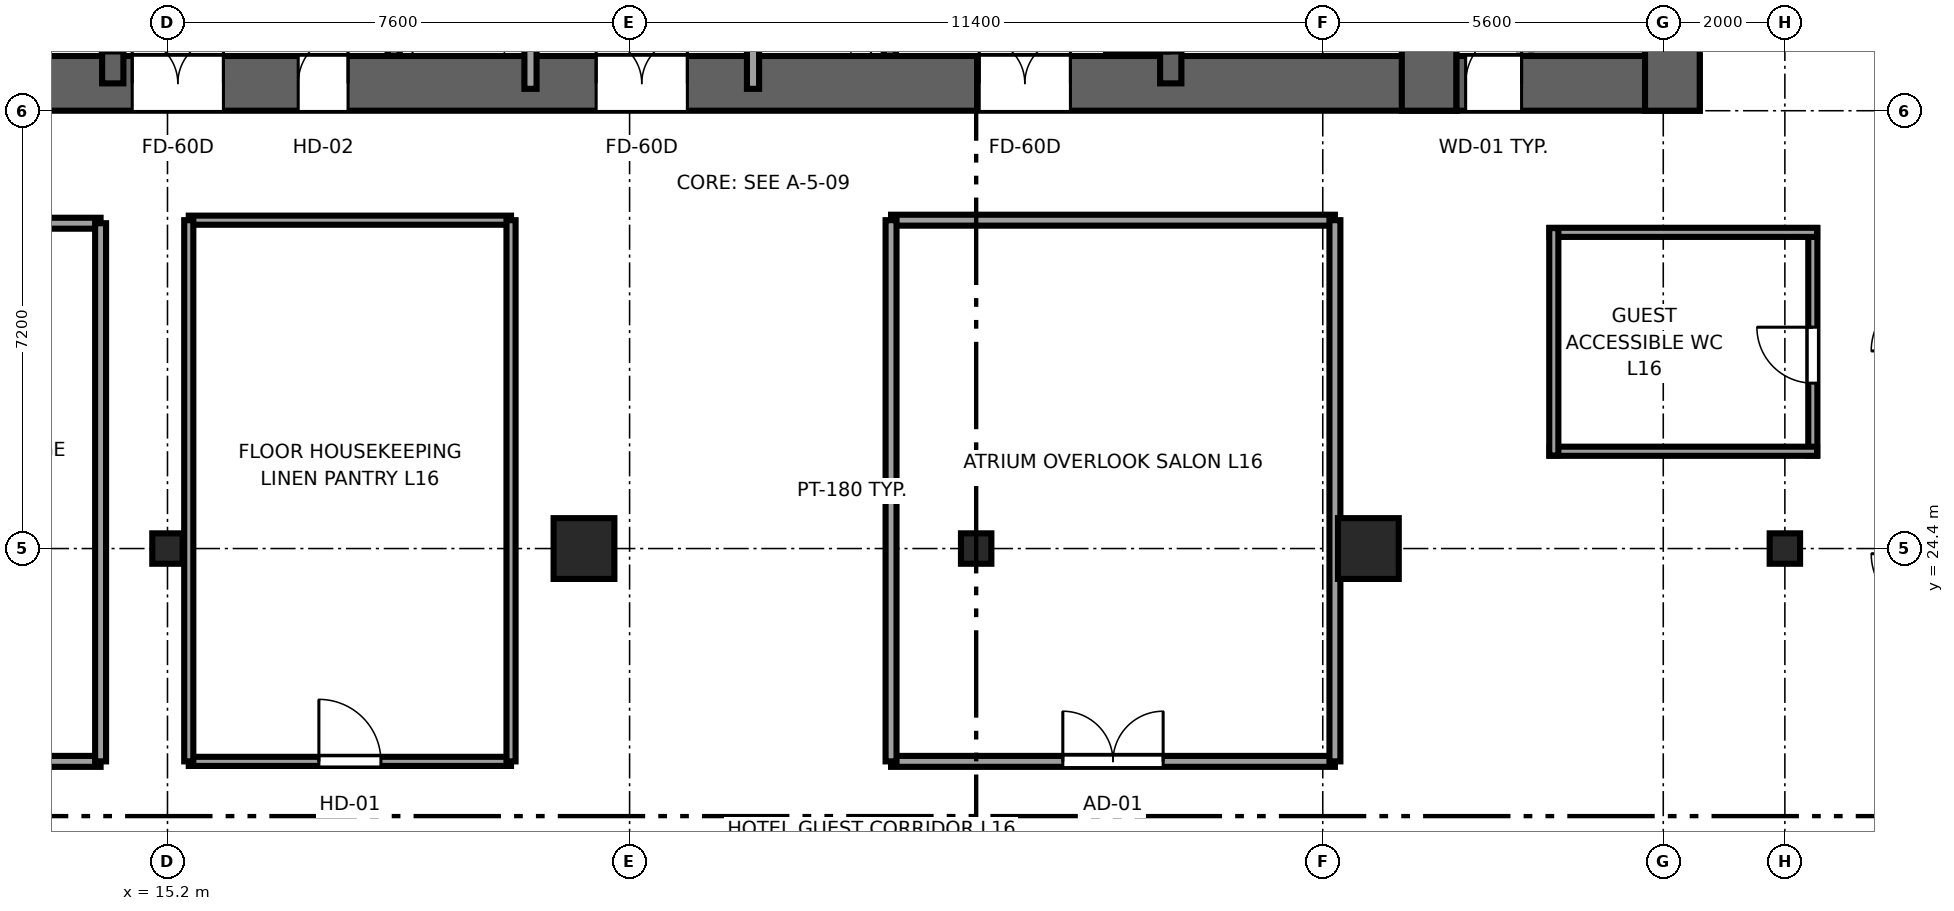
"""IFC4 building model, lengths in metres.
Left out: names, types, materials, properties, quantities, classifications, styles, units other than length and angle.
Written with IfcOpenShell. Run it as: python <this file> out.ifc"""

import sys

from ifc_helpers import new_model, si_unit, direction, frame, frame_2d, origin, origin_2d, place, context, subcontext, project, spatial, rectangle, i_section, extrude, source, transform, mapped, element, fill, save


model = new_model("IFC4")
c1 = context("Model", 3, precision=1e-05, world=origin(), true_north=direction((0.0, 1.0)))
c2 = subcontext(c1, "Body", "Model", "MODEL_VIEW")
j1 = project(units=[si_unit("LENGTHUNIT", "METRE"), si_unit("PLANEANGLEUNIT", "RADIAN")], contexts=[c1])
p1 = place(None, origin())
s1 = spatial("IfcSite", under=j1, at=p1, CompositionType="ELEMENT")
p2 = place(p1, origin())
s2 = spatial("IfcBuilding", under=s1, at=p2, CompositionType="ELEMENT")
p3 = place(p2, frame((0.0, 0.0, 67.5)))
s3 = spatial("IfcBuildingStorey", under=s2, at=p3, CompositionType="ELEMENT", Elevation=67.5)
p4 = place(p3, frame((9.6, 32.05, 0.0), z_axis=(0.0, 0.0, 1.0), x_axis=(1.0, 0.0, 0.0)))
e1 = element("IfcWall", 1, at=p4, inside=s3, PredefinedType="SHEAR", context=c2, shape_type="SweptSolid", body=[
    extrude(rectangle(XDim=26.8, YDim=0.9, at=frame_2d((13.4, 0.0))), origin(), (0.0, 0.0, 1.0), 3.55),
])
p5 = place(p4, frame((6.52, 0.0, 0.0), z_axis=(0.0, 0.0, 1.0), x_axis=(-1.0, 0.0, 0.0)))
e2 = element("IfcOpeningElement", 2, at=p5, cuts=e1, PredefinedType="OPENING", context=c2, shape_type="SweptSolid", body=[
    extrude(rectangle(XDim=1.5, YDim=2.04, at=frame_2d((0.75, 1.02))), frame((0.0, 0.46, 0.0), z_axis=(0.0, -1.0, 0.0), x_axis=(1.0, 0.0, 0.0)), (0.0, 0.0, 1.0), 0.92),
])
p6 = place(p4, frame((14.15, 0.0, 0.0), z_axis=(0.0, 0.0, 1.0), x_axis=(-1.0, 0.0, 0.0)))
e3 = element("IfcOpeningElement", 3, at=p6, cuts=e1, PredefinedType="OPENING", context=c2, shape_type="SweptSolid", body=[
    extrude(rectangle(XDim=1.5, YDim=2.04, at=frame_2d((0.75, 1.02))), frame((0.0, 0.46, 0.0), z_axis=(0.0, -1.0, 0.0), x_axis=(1.0, 0.0, 0.0)), (0.0, 0.0, 1.0), 0.92),
])
p7 = place(p4, frame((20.45, 0.0, 0.0), z_axis=(0.0, 0.0, 1.0), x_axis=(-1.0, 0.0, 0.0)))
e4 = element("IfcOpeningElement", 4, at=p7, cuts=e1, PredefinedType="OPENING", context=c2, shape_type="SweptSolid", body=[
    extrude(rectangle(XDim=1.5, YDim=2.04, at=frame_2d((0.75, 1.02))), frame((0.0, 0.46, 0.0), z_axis=(0.0, -1.0, 0.0), x_axis=(1.0, 0.0, 0.0)), (0.0, 0.0, 1.0), 0.92),
])
p8 = place(p4, frame((8.57, 0.0, 0.0), z_axis=(0.0, 0.0, 1.0), x_axis=(-1.0, 0.0, 0.0)))
e5 = element("IfcOpeningElement", 5, at=p8, cuts=e1, PredefinedType="OPENING", context=c2, shape_type="SweptSolid", body=[
    extrude(rectangle(XDim=0.82, YDim=2.01, at=frame_2d((0.41, 1.005))), frame((0.0, 0.46, 0.0), z_axis=(0.0, -1.0, 0.0), x_axis=(1.0, 0.0, 0.0)), (0.0, 0.0, 1.0), 0.92),
])
p9 = place(p3, frame((35.95, 31.6, 0.0), z_axis=(0.0, 0.0, 1.0), x_axis=(0.0, 1.0, 0.0)))
e6 = element("IfcWall", 6, at=p9, inside=s3, PredefinedType="SHEAR", context=c2, shape_type="SweptSolid", body=[
    extrude(rectangle(XDim=13.6, YDim=0.9, at=frame_2d((6.8, 0.0))), origin(), (0.0, 0.0, 1.0), 3.55),
])
p10 = place(p3, frame((14.3, 32.05, 0.0), z_axis=(0.0, 0.0, 1.0), x_axis=(0.0, 1.0, 0.0)))
e7 = element("IfcWall", 7, at=p10, inside=s3, PredefinedType="SHEAR", context=c2, shape_type="SweptSolid", body=[
    extrude(rectangle(XDim=12.7, YDim=0.35, at=frame_2d((6.35, 0.0))), origin(), (0.0, 0.0, 1.0), 3.55),
])
p11 = place(p10, frame((0.5, 0.0, 0.0)))
e8 = element("IfcOpeningElement", 8, at=p11, cuts=e7, PredefinedType="OPENING", context=c2, shape_type="SweptSolid", body=[
    extrude(rectangle(XDim=1.1, YDim=2.12, at=frame_2d((0.55, 1.06))), frame((0.0, 0.185, 0.0), z_axis=(0.0, -1.0, 0.0), x_axis=(1.0, 0.0, 0.0)), (0.0, 0.0, 1.0), 0.37),
])
p12 = place(p3, frame((31.7, 32.05, 0.0), z_axis=(0.0, 0.0, 1.0), x_axis=(0.0, 1.0, 0.0)))
e9 = element("IfcWall", 9, at=p12, inside=s3, PredefinedType="SHEAR", context=c2, shape_type="SweptSolid", body=[
    extrude(rectangle(XDim=12.7, YDim=0.35, at=frame_2d((6.35, 0.0))), origin(), (0.0, 0.0, 1.0), 3.55),
])
p13 = place(p12, frame((1.6, 0.0, 0.0), z_axis=(0.0, 0.0, 1.0), x_axis=(-1.0, 0.0, 0.0)))
e10 = element("IfcOpeningElement", 10, at=p13, cuts=e9, PredefinedType="OPENING", context=c2, shape_type="SweptSolid", body=[
    extrude(rectangle(XDim=1.1, YDim=2.12, at=frame_2d((0.55, 1.06))), frame((0.0, 0.185, 0.0), z_axis=(0.0, -1.0, 0.0), x_axis=(1.0, 0.0, 0.0)), (0.0, 0.0, 1.0), 0.37),
])
p14 = place(p3, frame((36.4, 32.05, 0.0), z_axis=(0.0, 0.0, 1.0), x_axis=(1.0, 0.0, 0.0)))
e11 = element("IfcWall", 11, at=p14, inside=s3, PredefinedType="SHEAR", context=c2, shape_type="SweptSolid", body=[
    extrude(rectangle(XDim=4.0, YDim=0.9, at=frame_2d((2.0, 0.0))), origin(), (0.0, 0.0, 1.0), 3.55),
])
p15 = place(p14, frame((1.07, 0.0, 0.0), z_axis=(0.0, 0.0, 1.0), x_axis=(-1.0, 0.0, 0.0)))
e12 = element("IfcOpeningElement", 12, at=p15, cuts=e11, PredefinedType="OPENING", context=c2, shape_type="SweptSolid", body=[
    extrude(rectangle(XDim=0.92, YDim=2.01, at=frame_2d((0.46, 1.005))), frame((0.0, 0.46, 0.0), z_axis=(0.0, -1.0, 0.0), x_axis=(1.0, 0.0, 0.0)), (0.0, 0.0, 1.0), 0.92),
])
p16 = place(p3, frame((39.95, 31.6, 0.0), z_axis=(0.0, 0.0, 1.0), x_axis=(0.0, 1.0, 0.0)))
e13 = element("IfcWall", 13, at=p16, inside=s3, PredefinedType="SHEAR", context=c2, shape_type="SweptSolid", body=[
    extrude(rectangle(XDim=13.6, YDim=0.9, at=frame_2d((6.8, 0.0))), origin(), (0.0, 0.0, 1.0), 3.55),
])
m1 = source(origin(), c2, "Body", "SweptSolid", [
    extrude(i_section(OverallWidth=0.5, OverallDepth=0.5, WebThickness=0.028, FlangeThickness=0.045, at=origin_2d()), origin(), (0.0, 0.0, 1.0), 3.55),
])
p17 = place(p3, frame((15.2, 24.4, 0.0), z_axis=(0.0, 0.0, 1.0), x_axis=(1.0, 0.0, 0.0)))
e14 = element("IfcColumn", 14, at=p17, inside=s3, PredefinedType="COLUMN", context=c2, shape_type="MappedRepresentation", body=[
    mapped(m1, transform((0.0, 0.0, 0.0), x_axis=(1.0, 0.0, 0.0), y_axis=(0.0, 1.0, 0.0), z_axis=(0.0, 0.0, 1.0), scale=1.0)),
])
m2 = source(origin(), c2, "Body", "SweptSolid", [
    extrude(rectangle(XDim=1.0, YDim=1.0, at=origin_2d()), origin(), (0.0, 0.0, 1.0), 3.55),
])
for number, where, z_axis, x_axis in (
    (15, (22.05, 24.4, 0.0), (0.0, 0.0, 1.0), (1.0, 0.0, 0.0)),
    (16, (34.95, 24.4, 0.0), (0.0, 0.0, 1.0), (1.0, 0.0, 0.0)),
):
    element("IfcColumn", number, at=place(p3, frame(where, z_axis=z_axis, x_axis=x_axis)), inside=s3, PredefinedType="COLUMN", context=c2, shape_type="MappedRepresentation", body=[
        mapped(m2, transform((0.0, 0.0, 0.0), x_axis=(1.0, 0.0, 0.0), y_axis=(0.0, 1.0, 0.0), z_axis=(0.0, 0.0, 1.0), scale=1.0)),
    ])
for number, where, z_axis, x_axis in (
    (17, (41.8, 24.4, 0.0), (0.0, 0.0, 1.0), (1.0, 0.0, 0.0)),
    (18, (28.5, 24.4, 0.0), (0.0, 0.0, 1.0), (1.0, 0.0, 0.0)),
):
    element("IfcColumn", number, at=place(p3, frame(where, z_axis=z_axis, x_axis=x_axis)), inside=s3, PredefinedType="COLUMN", context=c2, shape_type="MappedRepresentation", body=[
        mapped(m1, transform((0.0, 0.0, 0.0), x_axis=(1.0, 0.0, 0.0), y_axis=(0.0, 1.0, 0.0), z_axis=(0.0, 0.0, 1.0), scale=1.0)),
    ])
for number, where, z_axis, x_axis in (
    (19, (18.92, 32.504, 0.0), (0.0, 0.0, 1.0), (0.0, 1.0, 0.0)),
    (20, (27.08, 32.504, 0.0), (0.0, 0.0, 1.0), (0.0, 1.0, 0.0)),
):
    element("IfcWall", number, at=place(p3, frame(where, z_axis=z_axis, x_axis=x_axis)), inside=s3, PredefinedType="SOLIDWALL", context=c2, shape_type="SweptSolid", body=[
        extrude(rectangle(XDim=3.646, YDim=0.2, at=frame_2d((1.823, 0.0))), origin(), (0.0, 0.0, 1.0), 3.37),
    ])
for number, where, z_axis, x_axis in (
    (21, (21.17, 31.96, 0.0), (0.0, 0.0, 1.0), (0.0, 1.0, 0.0)),
    (22, (24.83, 31.96, 0.0), (0.0, 0.0, 1.0), (0.0, 1.0, 0.0)),
):
    element("IfcWall", number, at=place(p3, frame(where, z_axis=z_axis, x_axis=x_axis)), inside=s3, PredefinedType="SOLIDWALL", context=c2, shape_type="SweptSolid", body=[
        extrude(rectangle(XDim=12.58, YDim=0.2, at=frame_2d((6.29, 0.0))), origin(), (0.0, 0.0, 1.0), 3.37),
    ])
p18 = place(p3, frame((42.26, 25.93, 0.0), z_axis=(0.0, 0.0, 1.0), x_axis=(0.0, 1.0, 0.0)))
e23 = element("IfcWall", 23, at=p18, inside=s3, PredefinedType="PARTITIONING", context=c2, shape_type="SweptSolid", body=[
    extrude(rectangle(XDim=3.74, YDim=0.15, at=frame_2d((1.87, 0.0))), origin(), (0.0, 0.0, 1.0), 3.37),
])
p19 = place(p18, frame((1.19, 0.0, 0.0)))
e24 = element("IfcOpeningElement", 24, at=p19, cuts=e23, PredefinedType="OPENING", context=c2, shape_type="SweptSolid", body=[
    extrude(rectangle(XDim=0.92, YDim=2.01, at=frame_2d((0.46, 1.005))), frame((0.0, 0.085, 0.0), z_axis=(0.0, -1.0, 0.0), x_axis=(1.0, 0.0, 0.0)), (0.0, 0.0, 1.0), 0.17),
])
for number, where, z_axis, x_axis in (
    (25, (37.93, 26.0, 0.0), (0.0, 0.0, 1.0), (1.0, 0.0, 0.0)),
    (26, (37.93, 29.6, 0.0), (0.0, 0.0, 1.0), (1.0, 0.0, 0.0)),
):
    element("IfcWall", number, at=place(p3, frame(where, z_axis=z_axis, x_axis=x_axis)), inside=s3, PredefinedType="PARTITIONING", context=c2, shape_type="SweptSolid", body=[
        extrude(rectangle(XDim=4.4, YDim=0.15, at=frame_2d((2.2, 0.0))), origin(), (0.0, 0.0, 1.0), 3.37),
    ])
p20 = place(p3, frame((38.0, 25.93, 0.0), z_axis=(0.0, 0.0, 1.0), x_axis=(0.0, 1.0, 0.0)))
e27 = element("IfcWall", 27, at=p20, inside=s3, PredefinedType="PARTITIONING", context=c2, shape_type="SweptSolid", body=[
    extrude(rectangle(XDim=3.74, YDim=0.15, at=frame_2d((1.87, 0.0))), origin(), (0.0, 0.0, 1.0), 3.37),
])
p21 = place(p3, frame((9.88, 20.9, 0.0), z_axis=(0.0, 0.0, 1.0), x_axis=(1.0, 0.0, 0.0)))
e28 = element("IfcWall", 28, at=p21, inside=s3, PredefinedType="PARTITIONING", context=c2, shape_type="SweptSolid", body=[
    extrude(rectangle(XDim=4.22, YDim=0.18, at=frame_2d((2.11, 0.0))), origin(), (0.0, 0.0, 1.0), 3.37),
])
p22 = place(p21, frame((1.285, 0.0, 0.0)))
e29 = element("IfcOpeningElement", 29, at=p22, cuts=e28, PredefinedType="OPENING", context=c2, shape_type="SweptSolid", body=[
    extrude(rectangle(XDim=1.65, YDim=2.15, at=frame_2d((0.825, 1.075))), frame((0.0, 0.1, 0.0), z_axis=(0.0, -1.0, 0.0), x_axis=(1.0, 0.0, 0.0)), (0.0, 0.0, 1.0), 0.2),
])
p23 = place(p3, frame((9.88, 29.75, 0.0), z_axis=(0.0, 0.0, 1.0), x_axis=(1.0, 0.0, 0.0)))
e30 = element("IfcWall", 30, at=p23, inside=s3, PredefinedType="PARTITIONING", context=c2, shape_type="SweptSolid", body=[
    extrude(rectangle(XDim=4.22, YDim=0.18, at=frame_2d((2.11, 0.0))), origin(), (0.0, 0.0, 1.0), 3.37),
])
p24 = place(p3, frame((14.1, 20.9, 0.0), z_axis=(0.0, 0.0, 1.0), x_axis=(0.0, 1.0, 0.0)))
e31 = element("IfcWall", 31, at=p24, inside=s3, PredefinedType="PARTITIONING", context=c2, shape_type="SweptSolid", body=[
    extrude(rectangle(XDim=8.85, YDim=0.18, at=frame_2d((4.425, 0.0))), origin(), (0.0, 0.0, 1.0), 3.37),
])
p25 = place(p3, frame((27.1, 20.9, 0.0), z_axis=(0.0, 0.0, 1.0), x_axis=(1.0, 0.0, 0.0)))
e32 = element("IfcWall", 32, at=p25, inside=s3, PredefinedType="PARTITIONING", context=c2, shape_type="SweptSolid", body=[
    extrude(rectangle(XDim=7.3, YDim=0.18, at=frame_2d((3.65, 0.0))), origin(), (0.0, 0.0, 1.0), 3.37),
])
p26 = place(p25, frame((2.825, 0.0, 0.0)))
e33 = element("IfcOpeningElement", 33, at=p26, cuts=e32, PredefinedType="OPENING", context=c2, shape_type="SweptSolid", body=[
    extrude(rectangle(XDim=1.65, YDim=2.15, at=frame_2d((0.825, 1.075))), frame((0.0, 0.1, 0.0), z_axis=(0.0, -1.0, 0.0), x_axis=(1.0, 0.0, 0.0)), (0.0, 0.0, 1.0), 0.2),
])
p27 = place(p3, frame((27.1, 29.8, 0.0), z_axis=(0.0, 0.0, 1.0), x_axis=(1.0, 0.0, 0.0)))
e34 = element("IfcWall", 34, at=p27, inside=s3, PredefinedType="PARTITIONING", context=c2, shape_type="SweptSolid", body=[
    extrude(rectangle(XDim=7.3, YDim=0.18, at=frame_2d((3.65, 0.0))), origin(), (0.0, 0.0, 1.0), 3.37),
])
for number, where, z_axis, x_axis in (
    (35, (27.1, 20.9, 0.0), (0.0, 0.0, 1.0), (0.0, 1.0, 0.0)),
    (36, (34.4, 20.9, 0.0), (0.0, 0.0, 1.0), (0.0, 1.0, 0.0)),
):
    element("IfcWall", number, at=place(p3, frame(where, z_axis=z_axis, x_axis=x_axis)), inside=s3, PredefinedType="PARTITIONING", context=c2, shape_type="SweptSolid", body=[
        extrude(rectangle(XDim=8.9, YDim=0.18, at=frame_2d((4.45, 0.0))), origin(), (0.0, 0.0, 1.0), 3.37),
    ])
p28 = place(p3, frame((15.55, 20.9, 0.0), z_axis=(0.0, 0.0, 1.0), x_axis=(1.0, 0.0, 0.0)))
e37 = element("IfcWall", 37, at=p28, inside=s3, PredefinedType="PARTITIONING", context=c2, shape_type="SweptSolid", body=[
    extrude(rectangle(XDim=5.3, YDim=0.15, at=frame_2d((2.65, 0.0))), origin(), (0.0, 0.0, 1.0), 3.37),
])
p29 = place(p28, frame((2.14, 0.0, 0.0)))
e38 = element("IfcOpeningElement", 38, at=p29, cuts=e37, PredefinedType="OPENING", context=c2, shape_type="SweptSolid", body=[
    extrude(rectangle(XDim=1.02, YDim=2.03, at=frame_2d((0.51, 1.015))), frame((0.0, 0.085, 0.0), z_axis=(0.0, -1.0, 0.0), x_axis=(1.0, 0.0, 0.0)), (0.0, 0.0, 1.0), 0.17),
])
p30 = place(p3, frame((15.55, 29.8, 0.0), z_axis=(0.0, 0.0, 1.0), x_axis=(1.0, 0.0, 0.0)))
e39 = element("IfcWall", 39, at=p30, inside=s3, PredefinedType="PARTITIONING", context=c2, shape_type="SweptSolid", body=[
    extrude(rectangle(XDim=5.3, YDim=0.15, at=frame_2d((2.65, 0.0))), origin(), (0.0, 0.0, 1.0), 3.37),
])
for number, where, z_axis, x_axis in (
    (40, (15.55, 20.9, 0.0), (0.0, 0.0, 1.0), (0.0, 1.0, 0.0)),
    (41, (20.85, 20.9, 0.0), (0.0, 0.0, 1.0), (0.0, 1.0, 0.0)),
):
    element("IfcWall", number, at=place(p3, frame(where, z_axis=z_axis, x_axis=x_axis)), inside=s3, PredefinedType="PARTITIONING", context=c2, shape_type="SweptSolid", body=[
        extrude(rectangle(XDim=8.9, YDim=0.15, at=frame_2d((4.45, 0.0))), origin(), (0.0, 0.0, 1.0), 3.37),
    ])
m3 = source(origin(), c2, "Body", "SweptSolid", [
    extrude(rectangle(XDim=1.1, YDim=2.12, at=frame_2d((0.55, 1.06))), frame((0.0, 0.025, 0.0), z_axis=(0.0, -1.0, 0.0), x_axis=(1.0, 0.0, 0.0)), (0.0, 0.0, 1.0), 0.05),
])
p31 = place(p11, origin())
e42 = element("IfcDoor", 42, at=p31, inside=s3, OperationType="SINGLE_SWING_RIGHT", PredefinedType="DOOR", context=c2, shape_type="MappedRepresentation", body=[
    mapped(m3, transform((0.0, 0.0, 0.0), x_axis=(1.0, 0.0, 0.0), y_axis=(0.0, 1.0, 0.0), z_axis=(0.0, 0.0, 1.0), scale=1.0)),
])
fill(e8, e42)
p32 = place(p13, origin())
e43 = element("IfcDoor", 43, at=p32, inside=s3, OperationType="SINGLE_SWING_LEFT", PredefinedType="DOOR", context=c2, shape_type="MappedRepresentation", body=[
    mapped(m3, transform((0.0, 0.0, 0.0), x_axis=(1.0, 0.0, 0.0), y_axis=(0.0, 1.0, 0.0), z_axis=(0.0, 0.0, 1.0), scale=1.0)),
])
fill(e10, e43)
m4 = source(origin(), c2, "Body", "SweptSolid", [
    extrude(rectangle(XDim=1.5, YDim=2.04, at=frame_2d((0.75, 1.02))), frame((0.0, 0.025, 0.0), z_axis=(0.0, -1.0, 0.0), x_axis=(1.0, 0.0, 0.0)), (0.0, 0.0, 1.0), 0.05),
])
p33 = place(p5, origin())
e44 = element("IfcDoor", 44, at=p33, inside=s3, OperationType="DOUBLE_DOOR_SINGLE_SWING", PredefinedType="DOOR", context=c2, shape_type="MappedRepresentation", body=[
    mapped(m4, transform((0.0, 0.0, 0.0), x_axis=(1.0, 0.0, 0.0), y_axis=(0.0, 1.0, 0.0), z_axis=(0.0, 0.0, 1.0), scale=1.0)),
])
fill(e2, e44)
p34 = place(p6, origin())
e45 = element("IfcDoor", 45, at=p34, inside=s3, OperationType="DOUBLE_DOOR_SINGLE_SWING", PredefinedType="DOOR", context=c2, shape_type="MappedRepresentation", body=[
    mapped(m4, transform((0.0, 0.0, 0.0), x_axis=(1.0, 0.0, 0.0), y_axis=(0.0, 1.0, 0.0), z_axis=(0.0, 0.0, 1.0), scale=1.0)),
])
fill(e3, e45)
p35 = place(p7, origin())
e46 = element("IfcDoor", 46, at=p35, inside=s3, OperationType="DOUBLE_DOOR_SINGLE_SWING", PredefinedType="DOOR", context=c2, shape_type="MappedRepresentation", body=[
    mapped(m4, transform((0.0, 0.0, 0.0), x_axis=(1.0, 0.0, 0.0), y_axis=(0.0, 1.0, 0.0), z_axis=(0.0, 0.0, 1.0), scale=1.0)),
])
fill(e4, e46)
m5 = source(origin(), c2, "Body", "SweptSolid", [
    extrude(rectangle(XDim=0.82, YDim=2.01, at=frame_2d((0.41, 1.005))), frame((0.0, 0.025, 0.0), z_axis=(0.0, -1.0, 0.0), x_axis=(1.0, 0.0, 0.0)), (0.0, 0.0, 1.0), 0.05),
])
p36 = place(p8, origin())
e47 = element("IfcDoor", 47, at=p36, inside=s3, OperationType="SINGLE_SWING_RIGHT", PredefinedType="DOOR", context=c2, shape_type="MappedRepresentation", body=[
    mapped(m5, transform((0.0, 0.0, 0.0), x_axis=(1.0, 0.0, 0.0), y_axis=(0.0, 1.0, 0.0), z_axis=(0.0, 0.0, 1.0), scale=1.0)),
])
fill(e5, e47)
m6 = source(origin(), c2, "Body", "SweptSolid", [
    extrude(rectangle(XDim=0.92, YDim=2.01, at=frame_2d((0.46, 1.005))), frame((0.0, 0.025, 0.0), z_axis=(0.0, -1.0, 0.0), x_axis=(1.0, 0.0, 0.0)), (0.0, 0.0, 1.0), 0.05),
])
p37 = place(p15, origin())
e48 = element("IfcDoor", 48, at=p37, inside=s3, OperationType="SINGLE_SWING_RIGHT", PredefinedType="DOOR", context=c2, shape_type="MappedRepresentation", body=[
    mapped(m6, transform((0.0, 0.0, 0.0), x_axis=(1.0, 0.0, 0.0), y_axis=(0.0, 1.0, 0.0), z_axis=(0.0, 0.0, 1.0), scale=1.0)),
])
fill(e12, e48)
p38 = place(p19, origin())
e49 = element("IfcDoor", 49, at=p38, inside=s3, OperationType="SINGLE_SWING_RIGHT", PredefinedType="DOOR", context=c2, shape_type="MappedRepresentation", body=[
    mapped(m6, transform((0.0, 0.0, 0.0), x_axis=(1.0, 0.0, 0.0), y_axis=(0.0, 1.0, 0.0), z_axis=(0.0, 0.0, 1.0), scale=1.0)),
])
fill(e24, e49)
m7 = source(origin(), c2, "Body", "SweptSolid", [
    extrude(rectangle(XDim=1.65, YDim=2.15, at=frame_2d((0.825, 1.075))), frame((0.0, 0.025, 0.0), z_axis=(0.0, -1.0, 0.0), x_axis=(1.0, 0.0, 0.0)), (0.0, 0.0, 1.0), 0.05),
])
p39 = place(p26, origin())
e50 = element("IfcDoor", 50, at=p39, inside=s3, OperationType="DOUBLE_DOOR_SINGLE_SWING", PredefinedType="DOOR", context=c2, shape_type="MappedRepresentation", body=[
    mapped(m7, transform((0.0, 0.0, 0.0), x_axis=(1.0, 0.0, 0.0), y_axis=(0.0, 1.0, 0.0), z_axis=(0.0, 0.0, 1.0), scale=1.0)),
])
fill(e33, e50)
m8 = source(origin(), c2, "Body", "SweptSolid", [
    extrude(rectangle(XDim=1.02, YDim=2.03, at=frame_2d((0.51, 1.015))), frame((0.0, 0.025, 0.0), z_axis=(0.0, -1.0, 0.0), x_axis=(1.0, 0.0, 0.0)), (0.0, 0.0, 1.0), 0.05),
])
p40 = place(p29, origin())
e51 = element("IfcDoor", 51, at=p40, inside=s3, OperationType="SINGLE_SWING_LEFT", PredefinedType="DOOR", context=c2, shape_type="MappedRepresentation", body=[
    mapped(m8, transform((0.0, 0.0, 0.0), x_axis=(1.0, 0.0, 0.0), y_axis=(0.0, 1.0, 0.0), z_axis=(0.0, 0.0, 1.0), scale=1.0)),
])
fill(e38, e51)
save(model, sys.argv[1])
